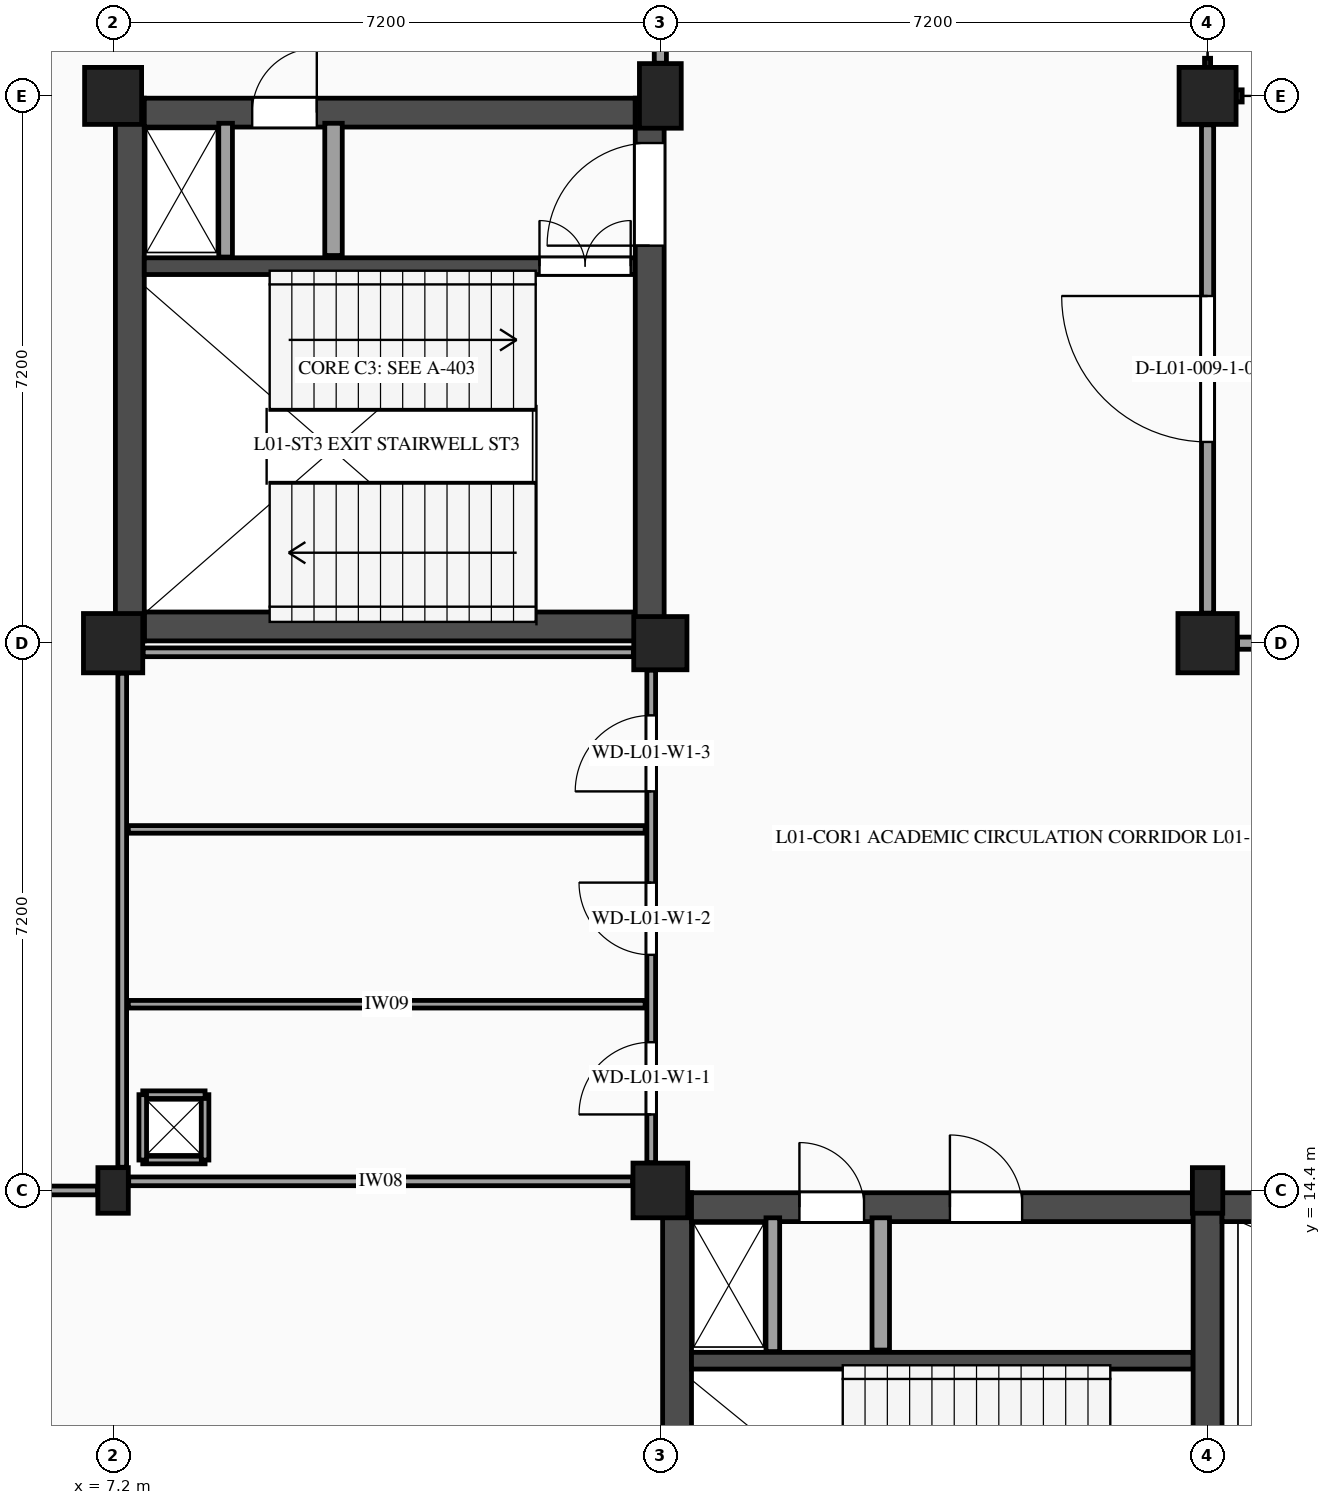
"""IFC4 building model, lengths in metres.
Left out: names, types, materials, properties, quantities, classifications, styles, units other than length and angle.
Written with IfcOpenShell. Run it as: python <this file> out.ifc"""

import sys

from ifc_helpers import new_model, si_unit, direction, frame, frame_2d, origin, origin_2d, place, context, subcontext, project, spatial, rectangle, extrude, element, fill, save


model = new_model("IFC4")
c1 = context("Model", 3, precision=1e-05, world=origin(), true_north=direction((0.0, 1.0)))
c2 = subcontext(c1, "Body", "Model", "MODEL_VIEW")
j1 = project(units=[si_unit("LENGTHUNIT", "METRE"), si_unit("PLANEANGLEUNIT", "RADIAN")], contexts=[c1])
p1 = place(None, origin())
s1 = spatial("IfcSite", under=j1, at=p1, CompositionType="ELEMENT")
p2 = place(p1, origin())
s2 = spatial("IfcBuilding", under=s1, at=p2, CompositionType="ELEMENT")
p3 = place(p2, frame((0.0, 0.0, 5.4)))
s3 = spatial("IfcBuildingStorey", under=s2, at=p3, CompositionType="ELEMENT", Elevation=5.4)
p4 = place(p3, frame((7.2, 14.4, 0.0), z_axis=(0.0, 0.0, 1.0), x_axis=(1.0, 0.0, 0.0)))
e1 = element("IfcColumn", 1, at=p4, inside=s3, PredefinedType="PILASTER", context=c2, shape_type="SweptSolid", body=[
    extrude(rectangle(XDim=0.4, YDim=0.6, at=origin_2d()), origin(), (0.0, 0.0, 1.0), 4.5),
])
p5 = place(p3, frame((7.2, 21.6, 0.0), z_axis=(0.0, 0.0, 1.0), x_axis=(1.0, 0.0, 0.0)))
e2 = element("IfcColumn", 2, at=p5, inside=s3, PredefinedType="COLUMN", context=c2, shape_type="SweptSolid", body=[
    extrude(rectangle(XDim=0.78, YDim=0.78, at=origin_2d()), origin(), (0.0, 0.0, 1.0), 4.5),
])
p6 = place(p3, frame((7.2, 28.8, 0.0), z_axis=(0.0, 0.0, 1.0), x_axis=(1.0, 0.0, 0.0)))
e3 = element("IfcColumn", 3, at=p6, inside=s3, PredefinedType="COLUMN", context=c2, shape_type="SweptSolid", body=[
    extrude(rectangle(XDim=0.75, YDim=0.75, at=origin_2d()), origin(), (0.0, 0.0, 1.0), 4.5),
])
p7 = place(p3, frame((14.4, 14.4, 0.0), z_axis=(0.0, 0.0, 1.0), x_axis=(1.0, 0.0, 0.0)))
e4 = element("IfcColumn", 4, at=p7, inside=s3, PredefinedType="COLUMN", context=c2, shape_type="SweptSolid", body=[
    extrude(rectangle(XDim=0.72, YDim=0.72, at=origin_2d()), origin(), (0.0, 0.0, 1.0), 4.5),
])
p8 = place(p3, frame((14.4, 21.6, 0.0), z_axis=(0.0, 0.0, 1.0), x_axis=(1.0, 0.0, 0.0)))
e5 = element("IfcColumn", 5, at=p8, inside=s3, PredefinedType="COLUMN", context=c2, shape_type="SweptSolid", body=[
    extrude(rectangle(XDim=0.7, YDim=0.7, at=origin_2d()), origin(), (0.0, 0.0, 1.0), 4.5),
])
p9 = place(p3, frame((14.4, 28.8, 0.0), z_axis=(0.0, 0.0, 1.0), x_axis=(1.0, 0.0, 0.0)))
e6 = element("IfcColumn", 6, at=p9, inside=s3, PredefinedType="COLUMN", context=c2, shape_type="SweptSolid", body=[
    extrude(rectangle(XDim=0.55, YDim=0.85, at=origin_2d()), origin(), (0.0, 0.0, 1.0), 4.5),
])
p10 = place(p3, frame((21.6, 14.4, 0.0), z_axis=(0.0, 0.0, 1.0), x_axis=(1.0, 0.0, 0.0)))
e7 = element("IfcColumn", 7, at=p10, inside=s3, PredefinedType="PILASTER", context=c2, shape_type="SweptSolid", body=[
    extrude(rectangle(XDim=0.4, YDim=0.6, at=origin_2d()), origin(), (0.0, 0.0, 1.0), 4.5),
])
p11 = place(p3, frame((21.6, 21.6, 0.0), z_axis=(0.0, 0.0, 1.0), x_axis=(1.0, 0.0, 0.0)))
e8 = element("IfcColumn", 8, at=p11, inside=s3, PredefinedType="COLUMN", context=c2, shape_type="SweptSolid", body=[
    extrude(rectangle(XDim=0.78, YDim=0.78, at=origin_2d()), origin(), (0.0, 0.0, 1.0), 4.5),
])
p12 = place(p3, frame((21.6, 28.8, 0.0), z_axis=(0.0, 0.0, 1.0), x_axis=(1.0, 0.0, 0.0)))
e9 = element("IfcColumn", 9, at=p12, inside=s3, PredefinedType="COLUMN", context=c2, shape_type="SweptSolid", body=[
    extrude(rectangle(XDim=0.75, YDim=0.75, at=origin_2d()), origin(), (0.0, 0.0, 1.0), 4.5),
])
p13 = place(p3, frame((14.62, 14.37, 0.0), z_axis=(0.0, 0.0, 1.0), x_axis=(0.0, -1.0, 0.0)))
e10 = element("IfcWall", 10, at=p13, inside=s3, PredefinedType="SHEAR", context=c2, shape_type="SweptSolid", body=[
    extrude(rectangle(XDim=7.14, YDim=0.38, at=frame_2d((3.57, 0.0))), origin(), (0.0, 0.0, 1.0), 4.21),
])
p14 = place(p3, frame((14.81, 14.18, 0.0), z_axis=(0.0, 0.0, 1.0), x_axis=(1.0, 0.0, 0.0)))
e11 = element("IfcWall", 11, at=p14, inside=s3, PredefinedType="SHEAR", context=c2, shape_type="SweptSolid", body=[
    extrude(rectangle(XDim=6.6, YDim=0.38, at=frame_2d((3.3, 0.0))), origin(), (0.0, 0.0, 1.0), 4.21),
])
p15 = place(p14, frame((1.42, 0.0, 0.0)))
e12 = element("IfcOpeningElement", 12, at=p15, cuts=e11, PredefinedType="OPENING", context=c2, shape_type="SweptSolid", body=[
    extrude(rectangle(XDim=0.85, YDim=2.1, at=frame_2d((0.425, 1.05))), frame((0.0, 0.2, 0.0), z_axis=(0.0, -1.0, 0.0), x_axis=(1.0, 0.0, 0.0)), (0.0, 0.0, 1.0), 0.4),
])
p16 = place(p14, frame((3.4, 0.0, 0.0)))
e13 = element("IfcOpeningElement", 13, at=p16, cuts=e11, PredefinedType="OPENING", context=c2, shape_type="SweptSolid", body=[
    extrude(rectangle(XDim=0.95, YDim=2.15, at=frame_2d((0.475, 1.075))), frame((0.0, 0.2, 0.0), z_axis=(0.0, -1.0, 0.0), x_axis=(1.0, 0.0, 0.0)), (0.0, 0.0, 1.0), 0.4),
])
p17 = place(p3, frame((14.81, 12.16, 0.0), z_axis=(0.0, 0.0, 1.0), x_axis=(1.0, 0.0, 0.0)))
e14 = element("IfcWall", 14, at=p17, inside=s3, PredefinedType="SHEAR", context=c2, shape_type="SweptSolid", body=[
    extrude(rectangle(XDim=6.6, YDim=0.22, at=frame_2d((3.3, 0.0))), origin(), (0.0, 0.0, 1.0), 4.21),
])
p18 = place(p3, frame((17.3, 12.3, 0.0), z_axis=(0.0, 0.0, 1.0), x_axis=(0.0, 1.0, 0.0)))
e15 = element("IfcWall", 15, at=p18, inside=s3, PredefinedType="PARTITIONING", context=c2, shape_type="SweptSolid", body=[
    extrude(rectangle(XDim=1.74, YDim=0.23, at=frame_2d((0.87, 0.0))), origin(), (0.0, 0.0, 1.0), 4.21),
])
p19 = place(p3, frame((15.88, 12.28, 0.0), z_axis=(0.0, 0.0, 1.0), x_axis=(0.0, 1.0, 0.0)))
e16 = element("IfcWall", 16, at=p19, inside=s3, PredefinedType="PARTITIONING", context=c2, shape_type="SweptSolid", body=[
    extrude(rectangle(XDim=1.76, YDim=0.18, at=frame_2d((0.88, 0.0))), origin(), (0.0, 0.0, 1.0), 4.21),
])
p20 = place(p3, frame((21.6, 7.23, 0.0), z_axis=(0.0, 0.0, 1.0), x_axis=(0.0, 1.0, 0.0)))
e17 = element("IfcWall", 17, at=p20, inside=s3, PredefinedType="SHEAR", context=c2, shape_type="SweptSolid", body=[
    extrude(rectangle(XDim=7.14, YDim=0.38, at=frame_2d((3.57, 0.0))), origin(), (0.0, 0.0, 1.0), 4.21),
])
p21 = place(p20, frame((1.4, 0.0, 0.0)))
e18 = element("IfcOpeningElement", 18, at=p21, cuts=e17, PredefinedType="OPENING", context=c2, shape_type="SweptSolid", body=[
    extrude(rectangle(XDim=1.8, YDim=2.2, at=frame_2d((0.9, 1.1))), frame((0.0, 0.2, 0.0), z_axis=(0.0, -1.0, 0.0), x_axis=(1.0, 0.0, 0.0)), (0.0, 0.0, 1.0), 0.4),
])
p22 = place(p3, frame((21.79, 14.18, 0.0), z_axis=(0.0, 0.0, 1.0), x_axis=(1.0, 0.0, 0.0)))
e19 = element("IfcWall", 19, at=p22, inside=s3, PredefinedType="SHEAR", context=c2, shape_type="SweptSolid", body=[
    extrude(rectangle(XDim=6.6, YDim=0.38, at=frame_2d((3.3, 0.0))), origin(), (0.0, 0.0, 1.0), 4.21),
])
p23 = place(p3, frame((7.61, 21.82, 0.0), z_axis=(0.0, 0.0, 1.0), x_axis=(1.0, 0.0, 0.0)))
e20 = element("IfcWall", 20, at=p23, inside=s3, PredefinedType="SHEAR", context=c2, shape_type="SweptSolid", body=[
    extrude(rectangle(XDim=6.46, YDim=0.38, at=frame_2d((3.23, 0.0))), origin(), (0.0, 0.0, 1.0), 4.21),
])
p24 = place(p3, frame((7.42, 28.77, 0.0), z_axis=(0.0, 0.0, 1.0), x_axis=(0.0, -1.0, 0.0)))
e21 = element("IfcWall", 21, at=p24, inside=s3, PredefinedType="SHEAR", context=c2, shape_type="SweptSolid", body=[
    extrude(rectangle(XDim=7.14, YDim=0.38, at=frame_2d((3.57, 0.0))), origin(), (0.0, 0.0, 1.0), 4.21),
])
p25 = place(p3, frame((7.61, 28.58, 0.0), z_axis=(0.0, 0.0, 1.0), x_axis=(1.0, 0.0, 0.0)))
e22 = element("IfcWall", 22, at=p25, inside=s3, PredefinedType="SHEAR", context=c2, shape_type="SweptSolid", body=[
    extrude(rectangle(XDim=6.46, YDim=0.38, at=frame_2d((3.23, 0.0))), origin(), (0.0, 0.0, 1.0), 4.21),
])
p26 = place(p25, frame((1.42, 0.0, 0.0)))
e23 = element("IfcOpeningElement", 23, at=p26, cuts=e22, PredefinedType="OPENING", context=c2, shape_type="SweptSolid", body=[
    extrude(rectangle(XDim=0.85, YDim=2.1, at=frame_2d((0.425, 1.05))), frame((0.0, 0.2, 0.0), z_axis=(0.0, -1.0, 0.0), x_axis=(1.0, 0.0, 0.0)), (0.0, 0.0, 1.0), 0.4),
])
p27 = place(p3, frame((7.61, 26.56, 0.0), z_axis=(0.0, 0.0, 1.0), x_axis=(1.0, 0.0, 0.0)))
e24 = element("IfcWall", 24, at=p27, inside=s3, PredefinedType="SHEAR", context=c2, shape_type="SweptSolid", body=[
    extrude(rectangle(XDim=6.46, YDim=0.22, at=frame_2d((3.23, 0.0))), origin(), (0.0, 0.0, 1.0), 4.21),
])
p28 = place(p27, frame((5.2, 0.0, 0.0)))
e25 = element("IfcOpeningElement", 25, at=p28, cuts=e24, PredefinedType="OPENING", context=c2, shape_type="SweptSolid", body=[
    extrude(rectangle(XDim=1.2, YDim=2.2, at=frame_2d((0.6, 1.1))), frame((0.0, 0.12, 0.0), z_axis=(0.0, -1.0, 0.0), x_axis=(1.0, 0.0, 0.0)), (0.0, 0.0, 1.0), 0.24),
])
p29 = place(p3, frame((10.1, 26.7, 0.0), z_axis=(0.0, 0.0, 1.0), x_axis=(0.0, 1.0, 0.0)))
e26 = element("IfcWall", 26, at=p29, inside=s3, PredefinedType="PARTITIONING", context=c2, shape_type="SweptSolid", body=[
    extrude(rectangle(XDim=1.74, YDim=0.23, at=frame_2d((0.87, 0.0))), origin(), (0.0, 0.0, 1.0), 4.21),
])
p30 = place(p3, frame((8.68, 26.68, 0.0), z_axis=(0.0, 0.0, 1.0), x_axis=(0.0, 1.0, 0.0)))
e27 = element("IfcWall", 27, at=p30, inside=s3, PredefinedType="PARTITIONING", context=c2, shape_type="SweptSolid", body=[
    extrude(rectangle(XDim=1.76, YDim=0.18, at=frame_2d((0.88, 0.0))), origin(), (0.0, 0.0, 1.0), 4.21),
])
p31 = place(p3, frame((14.26, 21.63, 0.0), z_axis=(0.0, 0.0, 1.0), x_axis=(0.0, 1.0, 0.0)))
e28 = element("IfcWall", 28, at=p31, inside=s3, PredefinedType="SHEAR", context=c2, shape_type="SweptSolid", body=[
    extrude(rectangle(XDim=7.14, YDim=0.38, at=frame_2d((3.57, 0.0))), origin(), (0.0, 0.0, 1.0), 4.21),
])
p32 = place(p31, frame((5.2, 0.0, 0.0)))
e29 = element("IfcOpeningElement", 29, at=p32, cuts=e28, PredefinedType="OPENING", context=c2, shape_type="SweptSolid", body=[
    extrude(rectangle(XDim=1.35, YDim=2.15, at=frame_2d((0.675, 1.075))), frame((0.0, 0.2, 0.0), z_axis=(0.0, -1.0, 0.0), x_axis=(1.0, 0.0, 0.0)), (0.0, 0.0, 1.0), 0.4),
])
p33 = place(p3, frame((7.405, 14.52, 0.0), z_axis=(0.0, 0.0, 1.0), x_axis=(1.0, 0.0, 0.0)))
e30 = element("IfcWall", 30, at=p33, inside=s3, PredefinedType="PARTITIONING", context=c2, shape_type="SweptSolid", body=[
    extrude(rectangle(XDim=6.63, YDim=0.115, at=frame_2d((3.315, 0.0))), origin(), (0.0, 0.0, 1.0), 3.47),
])
p34 = place(p3, frame((7.595, 21.48, 0.0), z_axis=(0.0, 0.0, 1.0), x_axis=(1.0, 0.0, 0.0)))
e31 = element("IfcWall", 31, at=p34, inside=s3, PredefinedType="PARTITIONING", context=c2, shape_type="SweptSolid", body=[
    extrude(rectangle(XDim=6.45, YDim=0.115, at=frame_2d((3.225, 0.0))), origin(), (0.0, 0.0, 1.0), 3.47),
])
p35 = place(p3, frame((7.32, 14.705, 0.0), z_axis=(0.0, 0.0, 1.0), x_axis=(0.0, 1.0, 0.0)))
e32 = element("IfcWall", 32, at=p35, inside=s3, PredefinedType="PARTITIONING", context=c2, shape_type="SweptSolid", body=[
    extrude(rectangle(XDim=6.5, YDim=0.115, at=frame_2d((3.25, 0.0))), origin(), (0.0, 0.0, 1.0), 3.52),
])
p36 = place(p3, frame((14.28, 14.765, 0.0), z_axis=(0.0, 0.0, 1.0), x_axis=(0.0, 1.0, 0.0)))
e33 = element("IfcWall", 33, at=p36, inside=s3, PredefinedType="PARTITIONING", context=c2, shape_type="SweptSolid", body=[
    extrude(rectangle(XDim=6.48, YDim=0.115, at=frame_2d((3.24, 0.0))), origin(), (0.0, 0.0, 1.0), 3.52),
])
p37 = place(p36, frame((0.635, 0.0, 0.0)))
e34 = element("IfcOpeningElement", 34, at=p37, cuts=e33, PredefinedType="OPENING", context=c2, shape_type="SweptSolid", body=[
    extrude(rectangle(XDim=0.95, YDim=2.1, at=frame_2d((0.475, 1.05))), frame((0.0, 0.067, 0.0), z_axis=(0.0, -1.0, 0.0), x_axis=(1.0, 0.0, 0.0)), (0.0, 0.0, 1.0), 0.135),
])
p38 = place(p36, frame((2.735, 0.0, 0.0)))
e35 = element("IfcOpeningElement", 35, at=p38, cuts=e33, PredefinedType="OPENING", context=c2, shape_type="SweptSolid", body=[
    extrude(rectangle(XDim=0.95, YDim=2.1, at=frame_2d((0.475, 1.05))), frame((0.0, 0.067, 0.0), z_axis=(0.0, -1.0, 0.0), x_axis=(1.0, 0.0, 0.0)), (0.0, 0.0, 1.0), 0.135),
])
p39 = place(p36, frame((4.885, 0.0, 0.0)))
e36 = element("IfcOpeningElement", 36, at=p39, cuts=e33, PredefinedType="OPENING", context=c2, shape_type="SweptSolid", body=[
    extrude(rectangle(XDim=1.0, YDim=2.15, at=frame_2d((0.5, 1.075))), frame((0.0, 0.067, 0.0), z_axis=(0.0, -1.0, 0.0), x_axis=(1.0, 0.0, 0.0)), (0.0, 0.0, 1.0), 0.135),
])
for number, where, z_axis, x_axis in (
    (37, (7.4, 16.85, 0.0), (0.0, 0.0, 1.0), (1.0, 0.0, 0.0)),
    (38, (7.4, 19.15, 0.0), (0.0, 0.0, 1.0), (1.0, 0.0, 0.0)),
):
    element("IfcWall", number, at=place(p3, frame(where, z_axis=z_axis, x_axis=x_axis)), inside=s3, PredefinedType="PARTITIONING", context=c2, shape_type="SweptSolid", body=[
        extrude(rectangle(XDim=6.8, YDim=0.1, at=frame_2d((3.4, 0.0))), origin(), (0.0, 0.0, 1.0), 4.21),
    ])
p40 = place(p3, frame((7.59, 14.8, 0.0), z_axis=(0.0, 0.0, 1.0), x_axis=(1.0, 0.0, 0.0)))
e39 = element("IfcWall", 39, at=p40, inside=s3, PredefinedType="PARTITIONING", context=c2, shape_type="SweptSolid", body=[
    extrude(rectangle(XDim=0.82, YDim=0.1, at=frame_2d((0.41, 0.0))), origin(), (0.0, 0.0, 1.0), 4.21),
])
p41 = place(p3, frame((8.41, 14.8, 0.0), z_axis=(0.0, 0.0, 1.0), x_axis=(0.0, 1.0, 0.0)))
e40 = element("IfcWall", 40, at=p41, inside=s3, PredefinedType="PARTITIONING", context=c2, shape_type="SweptSolid", body=[
    extrude(rectangle(XDim=0.86, YDim=0.1, at=frame_2d((0.43, 0.0))), origin(), (0.0, 0.0, 1.0), 4.21),
])
p42 = place(p3, frame((8.41, 15.66, 0.0), z_axis=(0.0, 0.0, 1.0), x_axis=(-1.0, 0.0, 0.0)))
e41 = element("IfcWall", 41, at=p42, inside=s3, PredefinedType="PARTITIONING", context=c2, shape_type="SweptSolid", body=[
    extrude(rectangle(XDim=0.82, YDim=0.1, at=frame_2d((0.41, 0.0))), origin(), (0.0, 0.0, 1.0), 4.21),
])
p43 = place(p3, frame((7.59, 15.66, 0.0), z_axis=(0.0, 0.0, 1.0), x_axis=(0.0, -1.0, 0.0)))
e42 = element("IfcWall", 42, at=p43, inside=s3, PredefinedType="PARTITIONING", context=c2, shape_type="SweptSolid", body=[
    extrude(rectangle(XDim=0.86, YDim=0.1, at=frame_2d((0.43, 0.0))), origin(), (0.0, 0.0, 1.0), 4.21),
])
p44 = place(p3, frame((0.365, 14.4, 0.0), z_axis=(0.0, 0.0, 1.0), x_axis=(1.0, 0.0, 0.0)))
e43 = element("IfcWall", 43, at=p44, inside=s3, PredefinedType="PARTITIONING", context=c2, shape_type="SweptSolid", body=[
    extrude(rectangle(XDim=6.63, YDim=0.115, at=frame_2d((3.315, 0.0))), origin(), (0.0, 0.0, 1.0), 3.46),
])
p45 = place(p44, frame((2.84, 0.0, 0.0)))
e44 = element("IfcOpeningElement", 44, at=p45, cuts=e43, PredefinedType="OPENING", context=c2, shape_type="SweptSolid", body=[
    extrude(rectangle(XDim=0.95, YDim=2.15, at=frame_2d((0.475, 1.075))), frame((0.0, 0.067, 0.0), z_axis=(0.0, -1.0, 0.0), x_axis=(1.0, 0.0, 0.0)), (0.0, 0.0, 1.0), 0.135),
])
p46 = place(p3, frame((14.4, 29.23, 0.0), z_axis=(0.0, 0.0, 1.0), x_axis=(0.0, 1.0, 0.0)))
e45 = element("IfcWall", 45, at=p46, inside=s3, PredefinedType="PARTITIONING", context=c2, shape_type="SweptSolid", body=[
    extrude(rectangle(XDim=6.465, YDim=0.16, at=frame_2d((3.232, 0.0))), origin(), (0.0, 0.0, 1.0), 3.515),
])
p47 = place(p3, frame((21.6, 21.995, 0.0), z_axis=(0.0, 0.0, 1.0), x_axis=(0.0, 1.0, 0.0)))
e46 = element("IfcWall", 46, at=p47, inside=s3, PredefinedType="PARTITIONING", context=c2, shape_type="SweptSolid", body=[
    extrude(rectangle(XDim=6.425, YDim=0.16, at=frame_2d((3.212, 0.0))), origin(), (0.0, 0.0, 1.0), 3.515),
])
p48 = place(p47, frame((2.252, 0.0, 0.0)))
e47 = element("IfcOpeningElement", 47, at=p48, cuts=e46, PredefinedType="OPENING", context=c2, shape_type="SweptSolid", body=[
    extrude(rectangle(XDim=1.92, YDim=2.35, at=frame_2d((0.96, 1.175))), frame((0.0, 0.09, 0.0), z_axis=(0.0, -1.0, 0.0), x_axis=(1.0, 0.0, 0.0)), (0.0, 0.0, 1.0), 0.18),
])
p49 = place(p3, frame((21.995, 21.6, 0.0), z_axis=(0.0, 0.0, 1.0), x_axis=(1.0, 0.0, 0.0)))
e48 = element("IfcWall", 48, at=p49, inside=s3, PredefinedType="PARTITIONING", context=c2, shape_type="SweptSolid", body=[
    extrude(rectangle(XDim=6.45, YDim=0.16, at=frame_2d((3.225, 0.0))), origin(), (0.0, 0.0, 1.0), 3.49),
])
p50 = place(p15, origin())
e49 = element("IfcDoor", 49, at=p50, inside=s3, OperationType="SINGLE_SWING_LEFT", PredefinedType="DOOR", context=c2, shape_type="SweptSolid", body=[
    extrude(rectangle(XDim=0.85, YDim=2.1, at=frame_2d((0.425, 1.05))), frame((0.0, 0.025, 0.0), z_axis=(0.0, -1.0, 0.0), x_axis=(1.0, 0.0, 0.0)), (0.0, 0.0, 1.0), 0.05),
])
fill(e12, e49)
p51 = place(p16, origin())
e50 = element("IfcDoor", 50, at=p51, inside=s3, OperationType="SINGLE_SWING_LEFT", PredefinedType="DOOR", context=c2, shape_type="SweptSolid", body=[
    extrude(rectangle(XDim=0.95, YDim=2.15, at=frame_2d((0.475, 1.075))), frame((0.0, 0.025, 0.0), z_axis=(0.0, -1.0, 0.0), x_axis=(1.0, 0.0, 0.0)), (0.0, 0.0, 1.0), 0.05),
])
fill(e13, e50)
p52 = place(p26, origin())
e51 = element("IfcDoor", 51, at=p52, inside=s3, OperationType="SINGLE_SWING_RIGHT", PredefinedType="DOOR", context=c2, shape_type="SweptSolid", body=[
    extrude(rectangle(XDim=0.85, YDim=2.1, at=frame_2d((0.425, 1.05))), frame((0.0, 0.025, 0.0), z_axis=(0.0, -1.0, 0.0), x_axis=(1.0, 0.0, 0.0)), (0.0, 0.0, 1.0), 0.05),
])
fill(e23, e51)
p53 = place(p28, origin())
e52 = element("IfcDoor", 52, at=p53, inside=s3, OperationType="DOUBLE_DOOR_SINGLE_SWING", PredefinedType="DOOR", context=c2, shape_type="SweptSolid", body=[
    extrude(rectangle(XDim=1.2, YDim=2.2, at=frame_2d((0.6, 1.1))), frame((0.0, 0.025, 0.0), z_axis=(0.0, -1.0, 0.0), x_axis=(1.0, 0.0, 0.0)), (0.0, 0.0, 1.0), 0.05),
])
fill(e25, e52)
p54 = place(p32, origin())
e53 = element("IfcDoor", 53, at=p54, inside=s3, OperationType="SINGLE_SWING_LEFT", PredefinedType="DOOR", context=c2, shape_type="SweptSolid", body=[
    extrude(rectangle(XDim=1.35, YDim=2.15, at=frame_2d((0.675, 1.075))), frame((0.0, 0.025, 0.0), z_axis=(0.0, -1.0, 0.0), x_axis=(1.0, 0.0, 0.0)), (0.0, 0.0, 1.0), 0.05),
])
fill(e29, e53)
p55 = place(p37, origin())
e54 = element("IfcDoor", 54, at=p55, inside=s3, OperationType="SINGLE_SWING_LEFT", PredefinedType="DOOR", context=c2, shape_type="SweptSolid", body=[
    extrude(rectangle(XDim=0.95, YDim=2.1, at=frame_2d((0.475, 1.05))), frame((0.0, 0.025, 0.0), z_axis=(0.0, -1.0, 0.0), x_axis=(1.0, 0.0, 0.0)), (0.0, 0.0, 1.0), 0.05),
])
fill(e34, e54)
p56 = place(p38, origin())
e55 = element("IfcDoor", 55, at=p56, inside=s3, OperationType="SINGLE_SWING_RIGHT", PredefinedType="DOOR", context=c2, shape_type="SweptSolid", body=[
    extrude(rectangle(XDim=0.95, YDim=2.1, at=frame_2d((0.475, 1.05))), frame((0.0, 0.025, 0.0), z_axis=(0.0, -1.0, 0.0), x_axis=(1.0, 0.0, 0.0)), (0.0, 0.0, 1.0), 0.05),
])
fill(e35, e55)
p57 = place(p39, origin())
e56 = element("IfcDoor", 56, at=p57, inside=s3, OperationType="SINGLE_SWING_LEFT", PredefinedType="DOOR", context=c2, shape_type="SweptSolid", body=[
    extrude(rectangle(XDim=1.0, YDim=2.15, at=frame_2d((0.5, 1.075))), frame((0.0, 0.025, 0.0), z_axis=(0.0, -1.0, 0.0), x_axis=(1.0, 0.0, 0.0)), (0.0, 0.0, 1.0), 0.05),
])
fill(e36, e56)
p58 = place(p48, origin())
e57 = element("IfcDoor", 57, at=p58, inside=s3, OperationType="SINGLE_SWING_RIGHT", PredefinedType="DOOR", context=c2, shape_type="SweptSolid", body=[
    extrude(rectangle(XDim=1.92, YDim=2.35, at=frame_2d((0.96, 1.175))), frame((0.0, 0.025, 0.0), z_axis=(0.0, -1.0, 0.0), x_axis=(1.0, 0.0, 0.0)), (0.0, 0.0, 1.0), 0.05),
])
fill(e47, e57)
save(model, sys.argv[1])
